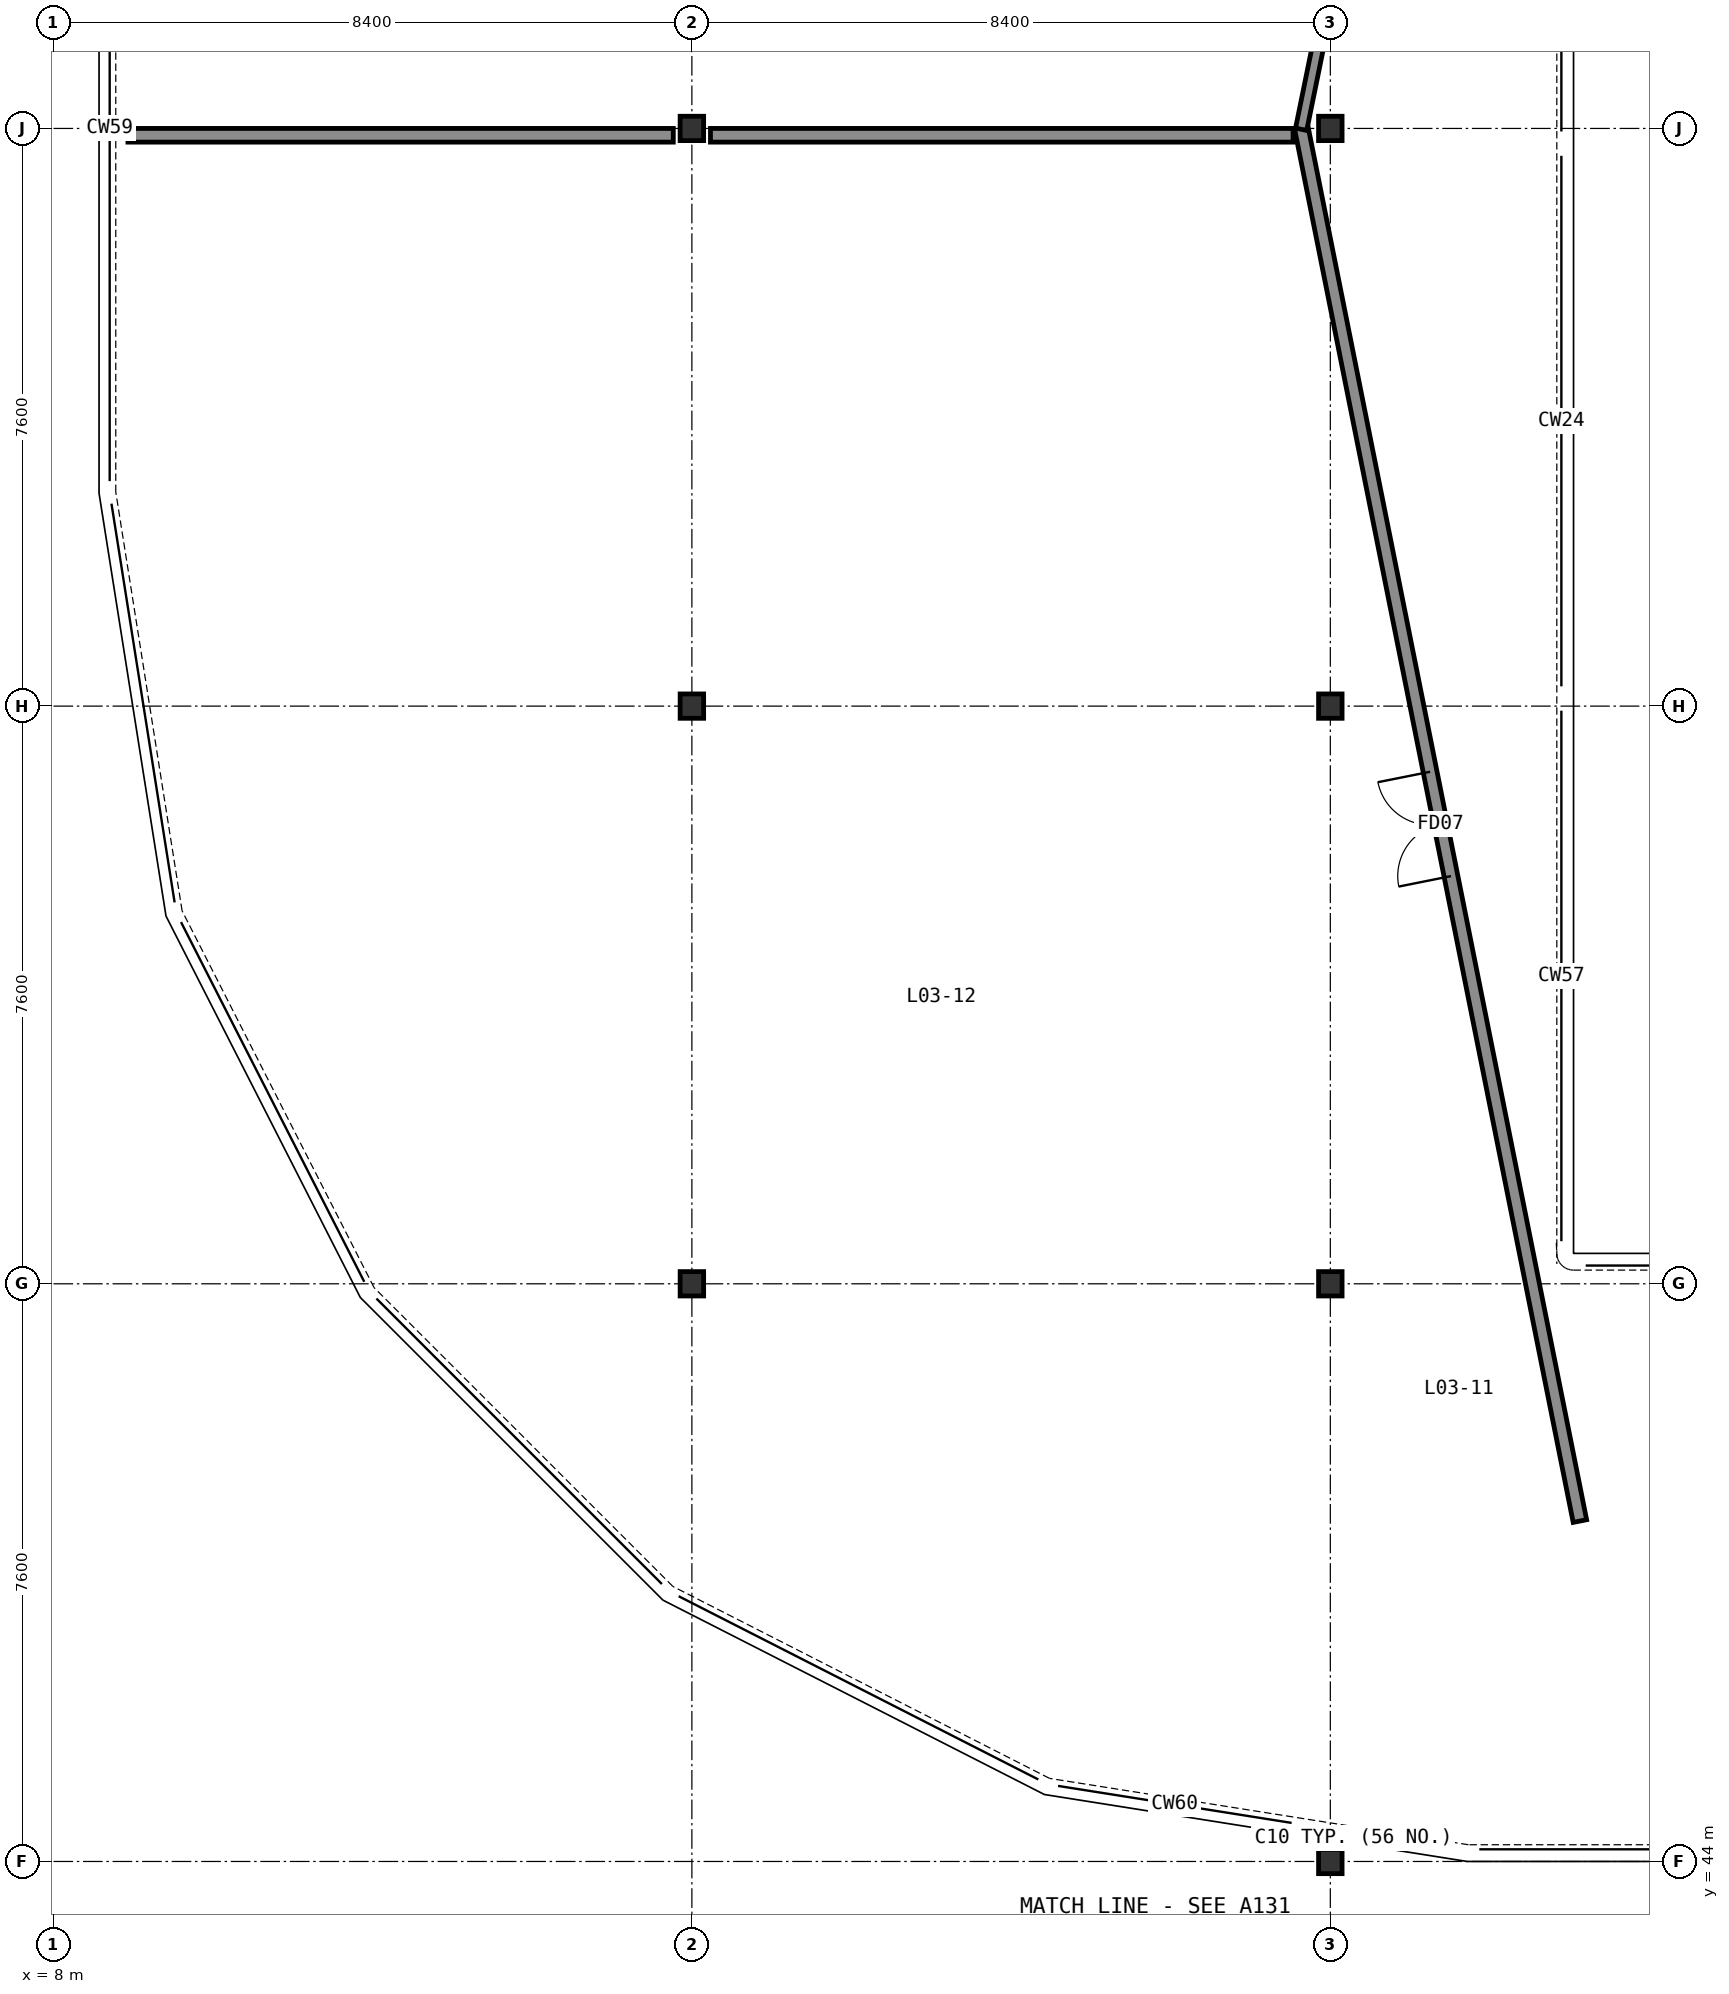
"""IFC4 building model, lengths in metres.
Left out: names, types, materials, properties, quantities, classifications, styles, units other than length and angle.
Written with IfcOpenShell. Run it as: python <this file> out.ifc"""

import sys

from ifc_helpers import new_model, si_unit, direction, frame, frame_2d, origin, origin_2d, place, context, subcontext, project, spatial, rectangle, i_section, extrude, element, fill, save


model = new_model("IFC4")
c1 = context("Model", 3, precision=1e-05, world=origin(), true_north=direction((0.0, 1.0)))
c2 = subcontext(c1, "Body", "Model", "MODEL_VIEW")
j1 = project(units=[si_unit("LENGTHUNIT", "METRE"), si_unit("PLANEANGLEUNIT", "RADIAN")], contexts=[c1])
p1 = place(None, origin())
s1 = spatial("IfcSite", under=j1, at=p1, CompositionType="ELEMENT")
p2 = place(p1, origin())
s2 = spatial("IfcBuilding", under=s1, at=p2, CompositionType="ELEMENT")
p3 = place(p2, frame((0.0, 0.0, 13.8)))
s3 = spatial("IfcBuildingStorey", under=s2, at=p3, CompositionType="ELEMENT", Elevation=13.8)
for number, where, z_axis, x_axis in (
    (1, (24.8, 44.0, 0.0), (0.0, 0.0, 1.0), (1.0, 0.0, 0.0)),
    (2, (16.4, 51.6, 0.0), (0.0, 0.0, 1.0), (1.0, 0.0, 0.0)),
    (3, (24.8, 51.6, 0.0), (0.0, 0.0, 1.0), (1.0, 0.0, 0.0)),
    (4, (16.4, 59.2, 0.0), (0.0, 0.0, 1.0), (1.0, 0.0, 0.0)),
    (5, (24.8, 59.2, 0.0), (0.0, 0.0, 1.0), (1.0, 0.0, 0.0)),
    (6, (16.4, 66.8, 0.0), (0.0, 0.0, 1.0), (1.0, 0.0, 0.0)),
    (7, (24.8, 66.8, 0.0), (0.0, 0.0, 1.0), (1.0, 0.0, 0.0)),
):
    element("IfcColumn", number, at=place(p3, frame(where, z_axis=z_axis, x_axis=x_axis)), inside=s3, PredefinedType="COLUMN", context=c2, shape_type="SweptSolid", body=[
        extrude(i_section(OverallWidth=0.309, OverallDepth=0.321, WebThickness=0.014, FlangeThickness=0.022, FilletRadius=0.015, at=origin_2d()), origin(), (0.0, 0.0, 1.0), 4.2),
    ])
p4 = place(p3, frame((28.084, 48.479, 0.0), z_axis=(0.0, 0.0, 1.0), x_axis=(-0.196088525725, 0.980586197169, 0.0)))
e8 = element("IfcWall", 8, at=p4, inside=s3, PredefinedType="PARTITIONING", context=c2, shape_type="SweptSolid", body=[
    extrude(rectangle(XDim=18.706, YDim=0.18, at=frame_2d((9.353, 0.0))), origin(), (0.0, 0.0, 1.0), 3.315),
])
p5 = place(p4, frame((8.653, 0.0, 0.0)))
e9 = element("IfcOpeningElement", 9, at=p5, cuts=e8, PredefinedType="OPENING", context=c2, shape_type="SweptSolid", body=[
    extrude(rectangle(XDim=1.4, YDim=2.15, at=frame_2d((0.7, 1.075))), frame((0.0, 0.1, 0.0), z_axis=(0.0, -1.0, 0.0), x_axis=(1.0, 0.0, 0.0)), (0.0, 0.0, 1.0), 0.2),
])
p6 = place(p3, frame((24.416, 66.789, 0.0), z_axis=(0.0, 0.0, 1.0), x_axis=(0.199839528002, 0.979828639634, 0.0)))
e10 = element("IfcWall", 10, at=p6, inside=s3, PredefinedType="PARTITIONING", context=c2, shape_type="SweptSolid", body=[
    extrude(rectangle(XDim=18.302, YDim=0.15, at=frame_2d((9.151, 0.0))), origin(), (0.0, 0.0, 1.0), 3.315),
])
p7 = place(p6, frame((8.711, 0.0, 0.0)))
e11 = element("IfcOpeningElement", 11, at=p7, cuts=e10, PredefinedType="OPENING", context=c2, shape_type="SweptSolid", body=[
    extrude(rectangle(XDim=0.88, YDim=2.08, at=frame_2d((0.44, 1.04))), frame((0.0, 0.085, 0.0), z_axis=(0.0, -1.0, 0.0), x_axis=(1.0, 0.0, 0.0)), (0.0, 0.0, 1.0), 0.17),
])
p8 = place(p3, frame((16.645, 66.71, 0.0), z_axis=(0.0, 0.0, 1.0), x_axis=(1.0, 0.0, 0.0)))
e12 = element("IfcWall", 12, at=p8, inside=s3, PredefinedType="PARTITIONING", context=c2, shape_type="SweptSolid", body=[
    extrude(rectangle(XDim=7.666, YDim=0.18, at=frame_2d((3.833, 0.0))), origin(), (0.0, 0.0, 1.0), 2.919),
])
p9 = place(p3, frame((8.98, 66.71, 0.0), z_axis=(0.0, 0.0, 1.0), x_axis=(1.0, 0.0, 0.0)))
e13 = element("IfcWall", 13, at=p9, inside=s3, PredefinedType="PARTITIONING", context=c2, shape_type="SweptSolid", body=[
    extrude(rectangle(XDim=7.176, YDim=0.18, at=frame_2d((3.588, 0.0))), origin(), (0.0, 0.0, 1.0), 2.919),
])
p10 = place(p5, origin())
e14 = element("IfcDoor", 14, at=p10, inside=s3, OperationType="DOUBLE_DOOR_SINGLE_SWING", PredefinedType="DOOR", context=c2, shape_type="SweptSolid", body=[
    extrude(rectangle(XDim=1.4, YDim=2.15, at=frame_2d((0.7, 1.075))), frame((0.0, 0.025, 0.0), z_axis=(0.0, -1.0, 0.0), x_axis=(1.0, 0.0, 0.0)), (0.0, 0.0, 1.0), 0.05),
])
fill(e9, e14)
save(model, sys.argv[1])
